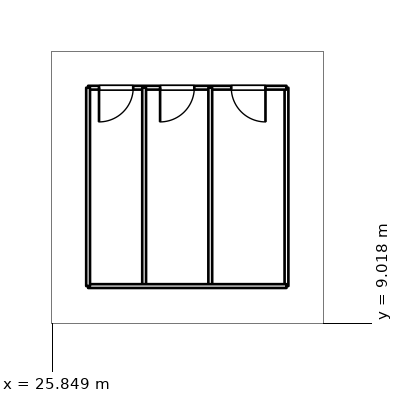
"""IFC4 building model, lengths in metres.
Left out: names, types, materials, properties, quantities, classifications, styles, units other than length and angle.
Written with IfcOpenShell. Run it as: python <this file> out.ifc"""

import sys

from ifc_helpers import new_model, si_unit, direction, frame, frame_2d, origin, place, context, subcontext, project, spatial, rectangle, extrude, element, fill, save


model = new_model("IFC4")
c1 = context("Model", 3, precision=1e-05, world=origin(), true_north=direction((0.0, 1.0)))
c2 = subcontext(c1, "Body", "Model", "MODEL_VIEW")
j1 = project(units=[si_unit("LENGTHUNIT", "METRE"), si_unit("PLANEANGLEUNIT", "RADIAN")], contexts=[c1])
p1 = place(None, origin())
s1 = spatial("IfcSite", under=j1, at=p1, CompositionType="ELEMENT")
p2 = place(p1, origin())
s2 = spatial("IfcBuilding", under=s1, at=p2, CompositionType="ELEMENT")
p3 = place(p2, frame((0.0, 0.0, 6.0)))
s3 = spatial("IfcBuildingStorey", under=s2, at=p3, CompositionType="ELEMENT", Elevation=6.0)
for number, where, z_axis, x_axis in (
    (1, (26.79, 9.99, 0.0), (0.0, 0.0, 1.0), (1.0, 0.0, 0.0)),
    (2, (32.01, 9.99, 0.0), (0.0, 0.0, 1.0), (0.0, 1.0, 0.0)),
):
    element("IfcWall", number, at=place(p3, frame(where, z_axis=z_axis, x_axis=x_axis)), inside=s3, PredefinedType="PARTITIONING", context=c2, shape_type="SweptSolid", body=[
        extrude(rectangle(XDim=5.22, YDim=0.1, at=frame_2d((2.61, 0.0))), origin(), (0.0, 0.0, 1.0), 4.7),
    ])
p4 = place(p3, frame((32.01, 15.21, 0.0), z_axis=(0.0, 0.0, 1.0), x_axis=(-1.0, 0.0, 0.0)))
e3 = element("IfcWall", 3, at=p4, inside=s3, PredefinedType="PARTITIONING", context=c2, shape_type="SweptSolid", body=[
    extrude(rectangle(XDim=5.22, YDim=0.1, at=frame_2d((2.61, 0.0))), origin(), (0.0, 0.0, 1.0), 4.7),
])
p5 = place(p4, frame((4.033, 0.0, 0.0)))
e4 = element("IfcOpeningElement", 4, at=p5, cuts=e3, PredefinedType="OPENING", context=c2, shape_type="SweptSolid", body=[
    extrude(rectangle(XDim=0.9, YDim=2.1, at=frame_2d((0.45, 1.05))), frame((0.0, 0.06, 0.0), z_axis=(0.0, -1.0, 0.0), x_axis=(1.0, 0.0, 0.0)), (0.0, 0.0, 1.0), 0.12),
])
p6 = place(p4, frame((2.426, 0.0, 0.0)))
e5 = element("IfcOpeningElement", 5, at=p6, cuts=e3, PredefinedType="OPENING", context=c2, shape_type="SweptSolid", body=[
    extrude(rectangle(XDim=0.9, YDim=2.1, at=frame_2d((0.45, 1.05))), frame((0.0, 0.06, 0.0), z_axis=(0.0, -1.0, 0.0), x_axis=(1.0, 0.0, 0.0)), (0.0, 0.0, 1.0), 0.12),
])
p7 = place(p4, frame((0.553, 0.0, 0.0)))
e6 = element("IfcOpeningElement", 6, at=p7, cuts=e3, PredefinedType="OPENING", context=c2, shape_type="SweptSolid", body=[
    extrude(rectangle(XDim=0.9, YDim=2.1, at=frame_2d((0.45, 1.05))), frame((0.0, 0.06, 0.0), z_axis=(0.0, -1.0, 0.0), x_axis=(1.0, 0.0, 0.0)), (0.0, 0.0, 1.0), 0.12),
])
for number, where, z_axis, x_axis in (
    (7, (26.79, 15.21, 0.0), (0.0, 0.0, 1.0), (0.0, -1.0, 0.0)),
    (8, (28.265, 9.99, 0.0), (0.0, 0.0, 1.0), (0.0, 1.0, 0.0)),
    (9, (30.005, 9.99, 0.0), (0.0, 0.0, 1.0), (0.0, 1.0, 0.0)),
):
    element("IfcWall", number, at=place(p3, frame(where, z_axis=z_axis, x_axis=x_axis)), inside=s3, PredefinedType="PARTITIONING", context=c2, shape_type="SweptSolid", body=[
        extrude(rectangle(XDim=5.22, YDim=0.1, at=frame_2d((2.61, 0.0))), origin(), (0.0, 0.0, 1.0), 4.7),
    ])
p8 = place(p5, origin())
e10 = element("IfcDoor", 10, at=p8, inside=s3, OperationType="SINGLE_SWING_RIGHT", PredefinedType="DOOR", context=c2, shape_type="SweptSolid", body=[
    extrude(rectangle(XDim=0.9, YDim=2.1, at=frame_2d((0.45, 1.05))), frame((0.0, 0.025, 0.0), z_axis=(0.0, -1.0, 0.0), x_axis=(1.0, 0.0, 0.0)), (0.0, 0.0, 1.0), 0.05),
])
fill(e4, e10)
p9 = place(p6, origin())
e11 = element("IfcDoor", 11, at=p9, inside=s3, OperationType="SINGLE_SWING_RIGHT", PredefinedType="DOOR", context=c2, shape_type="SweptSolid", body=[
    extrude(rectangle(XDim=0.9, YDim=2.1, at=frame_2d((0.45, 1.05))), frame((0.0, 0.025, 0.0), z_axis=(0.0, -1.0, 0.0), x_axis=(1.0, 0.0, 0.0)), (0.0, 0.0, 1.0), 0.05),
])
fill(e5, e11)
p10 = place(p7, origin())
e12 = element("IfcDoor", 12, at=p10, inside=s3, OperationType="SINGLE_SWING_LEFT", PredefinedType="DOOR", context=c2, shape_type="SweptSolid", body=[
    extrude(rectangle(XDim=0.9, YDim=2.1, at=frame_2d((0.45, 1.05))), frame((0.0, 0.025, 0.0), z_axis=(0.0, -1.0, 0.0), x_axis=(1.0, 0.0, 0.0)), (0.0, 0.0, 1.0), 0.05),
])
fill(e6, e12)
save(model, sys.argv[1])
